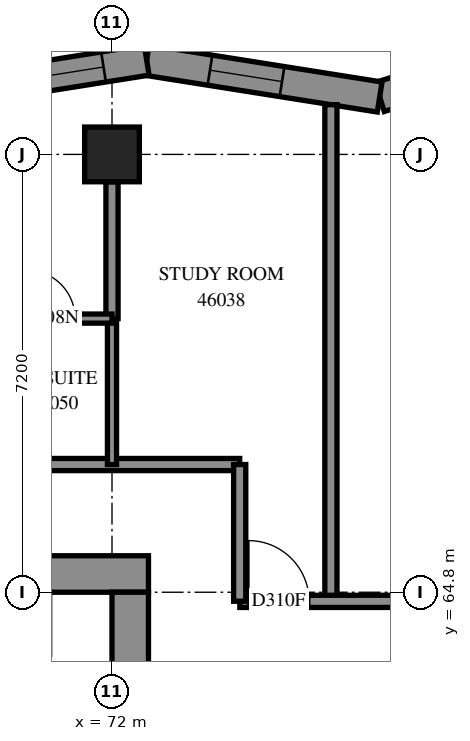
"""IFC4 building model, lengths in metres.
Left out: names, types, materials, properties, quantities, classifications, styles, units other than length and angle.
Written with IfcOpenShell. Run it as: python <this file> out.ifc"""

import sys

from ifc_helpers import new_model, si_unit, direction, frame, frame_2d, origin, origin_2d, place, context, subcontext, project, spatial, polyline, rectangle, outline, extrude, element, fill, save


model = new_model("IFC4")
c1 = context("Model", 3, precision=1e-05, world=origin(), true_north=direction((0.0, 1.0)))
c2 = subcontext(c1, "Body", "Model", "MODEL_VIEW")
j1 = project(units=[si_unit("LENGTHUNIT", "METRE"), si_unit("PLANEANGLEUNIT", "RADIAN")], contexts=[c1])
p1 = place(None, origin())
s1 = spatial("IfcSite", under=j1, at=p1, CompositionType="ELEMENT")
p2 = place(p1, origin())
s2 = spatial("IfcBuilding", under=s1, at=p2, CompositionType="ELEMENT")
p3 = place(p2, frame((0.0, 0.0, 169.4)))
s3 = spatial("IfcBuildingStorey", under=s2, at=p3, CompositionType="ELEMENT", Elevation=169.4)
p4 = place(p3, frame((72.0, 72.0, 0.0), z_axis=(0.0, 0.0, 1.0), x_axis=(1.0, 0.0, 0.0)))
e1 = element("IfcColumn", 1, at=p4, inside=s3, PredefinedType="COLUMN", context=c2, shape_type="SweptSolid", body=[
    extrude(rectangle(XDim=0.9, YDim=0.9, at=origin_2d()), origin(), (0.0, 0.0, 1.0), 3.1),
])
p5 = place(p3, frame((57.0, 65.1, -0.3), z_axis=(0.0, 0.0, 1.0), x_axis=(1.0, 0.0, 0.0)))
e2 = element("IfcWall", 2, at=p5, inside=s3, PredefinedType="SHEAR", context=c2, shape_type="SweptSolid", body=[
    extrude(rectangle(XDim=15.6, YDim=0.6, at=frame_2d((7.8, 0.0))), origin(), (0.0, 0.0, 1.0), 2.7),
])
p6 = place(p5, frame((10.6, 0.0, 0.3)))
e3 = element("IfcOpeningElement", 3, at=p6, cuts=e2, PredefinedType="OPENING", context=c2, shape_type="SweptSolid", body=[
    extrude(rectangle(XDim=0.8, YDim=2.1, at=frame_2d((0.4, 1.05))), frame((0.0, 0.31, 0.0), z_axis=(0.0, -1.0, 0.0), x_axis=(1.0, 0.0, 0.0)), (0.0, 0.0, 1.0), 0.62),
])
p7 = place(p3, frame((72.3, 50.4, -0.3), z_axis=(0.0, 0.0, 1.0), x_axis=(0.0, 1.0, 0.0)))
e4 = element("IfcWall", 4, at=p7, inside=s3, PredefinedType="SHEAR", context=c2, shape_type="SweptSolid", body=[
    extrude(rectangle(XDim=14.4, YDim=0.6, at=frame_2d((7.2, 0.0))), origin(), (0.0, 0.0, 1.0), 2.7),
])
p8 = place(p7, frame((4.55, 0.0, 0.3)))
e5 = element("IfcOpeningElement", 5, at=p8, cuts=e4, PredefinedType="OPENING", context=c2, shape_type="SweptSolid", body=[
    extrude(rectangle(XDim=1.1, YDim=2.1, at=frame_2d((0.55, 1.05))), frame((0.0, 0.31, 0.0), z_axis=(0.0, -1.0, 0.0), x_axis=(1.0, 0.0, 0.0)), (0.0, 0.0, 1.0), 0.62),
])
p9 = place(p7, frame((11.35, 0.0, 0.3)))
e6 = element("IfcOpeningElement", 6, at=p9, cuts=e4, PredefinedType="OPENING", context=c2, shape_type="SweptSolid", body=[
    extrude(rectangle(XDim=1.1, YDim=2.1, at=frame_2d((0.55, 1.05))), frame((0.0, 0.31, 0.0), z_axis=(0.0, -1.0, 0.0), x_axis=(1.0, 0.0, 0.0)), (0.0, 0.0, 1.0), 0.62),
])
p10 = place(p3, frame((80.063, 74.099, 0.0), z_axis=(0.0, 0.0, 1.0), x_axis=(-0.9536503551, -0.3009169326, 0.0)))
e7 = element("IfcWall", 7, at=p10, inside=s3, PredefinedType="SOLIDWALL", context=c2, shape_type="SweptSolid", body=[
    extrude(outline(polyline([(-0.218, -0.25), (3.78, -0.25), (3.898, 0.25), (0.218, 0.25), (-0.218, -0.25)])), origin(), (0.0, 0.0, 1.0), 3.1),
])
p11 = place(p10, frame((1.672, 0.0, 0.45)))
e8 = element("IfcOpeningElement", 8, at=p11, cuts=e7, PredefinedType="OPENING", context=c2, shape_type="SweptSolid", body=[
    extrude(rectangle(XDim=1.2, YDim=2.5, at=frame_2d((0.6, 1.25))), frame((0.0, 0.26, 0.0), z_axis=(0.0, -1.0, 0.0), x_axis=(1.0, 0.0, 0.0)), (0.0, 0.0, 1.0), 0.52),
])
p12 = place(p3, frame((76.402, 72.944, 0.0), z_axis=(0.0, 0.0, 1.0), x_axis=(-0.9877221729, 0.1562207065, 0.0)))
e9 = element("IfcWall", 9, at=p12, inside=s3, PredefinedType="SOLIDWALL", context=c2, shape_type="SweptSolid", body=[
    extrude(outline(polyline([(0.059, -0.25), (3.919, -0.25), (3.84, 0.25), (-0.059, 0.25), (0.059, -0.25)])), origin(), (0.0, 0.0, 1.0), 3.1),
])
p13 = place(p12, frame((1.626, 0.0, 0.45)))
e10 = element("IfcOpeningElement", 10, at=p13, cuts=e9, PredefinedType="OPENING", context=c2, shape_type="SweptSolid", body=[
    extrude(rectangle(XDim=1.2, YDim=2.5, at=frame_2d((0.6, 1.25))), frame((0.0, 0.26, 0.0), z_axis=(0.0, -1.0, 0.0), x_axis=(1.0, 0.0, 0.0)), (0.0, 0.0, 1.0), 0.52),
])
p14 = place(p3, frame((72.571, 73.55, 0.0), z_axis=(0.0, 0.0, 1.0), x_axis=(-0.9877213372, -0.1562259905, 0.0)))
e11 = element("IfcWall", 11, at=p14, inside=s3, PredefinedType="SOLIDWALL", context=c2, shape_type="SweptSolid", body=[
    extrude(outline(polyline([(-0.04, -0.25), (3.82, -0.25), (3.899, 0.25), (0.04, 0.25), (-0.04, -0.25)])), origin(), (0.0, 0.0, 1.0), 3.1),
])
p15 = place(p14, frame((0.719, 0.0, 0.45)))
e12 = element("IfcOpeningElement", 12, at=p15, cuts=e11, PredefinedType="OPENING", context=c2, shape_type="SweptSolid", body=[
    extrude(rectangle(XDim=2.8, YDim=2.5, at=frame_2d((1.4, 1.25))), frame((0.0, 0.26, 0.0), z_axis=(0.0, -1.0, 0.0), x_axis=(1.0, 0.0, 0.0)), (0.0, 0.0, 1.0), 0.52),
])
p16 = place(p3, frame((55.5, 66.9, 0.0), z_axis=(0.0, 0.0, 1.0), x_axis=(1.0, 0.0, 0.0)))
e13 = element("IfcWall", 13, at=p16, inside=s3, PredefinedType="PARTITIONING", context=c2, shape_type="SweptSolid", body=[
    extrude(rectangle(XDim=18.6, YDim=0.2, at=frame_2d((9.3, 0.0))), origin(), (0.0, 0.0, 1.0), 3.1),
])
p17 = place(p16, frame((4.45, 0.0, 0.0)))
e14 = element("IfcOpeningElement", 14, at=p17, cuts=e13, PredefinedType="OPENING", context=c2, shape_type="SweptSolid", body=[
    extrude(rectangle(XDim=0.9, YDim=2.1, at=frame_2d((0.45, 1.05))), frame((0.0, 0.11, 0.0), z_axis=(0.0, -1.0, 0.0), x_axis=(1.0, 0.0, 0.0)), (0.0, 0.0, 1.0), 0.22),
])
p18 = place(p16, frame((6.1, 0.0, 0.0)))
e15 = element("IfcOpeningElement", 15, at=p18, cuts=e13, PredefinedType="OPENING", context=c2, shape_type="SweptSolid", body=[
    extrude(rectangle(XDim=0.9, YDim=2.1, at=frame_2d((0.45, 1.05))), frame((0.0, 0.11, 0.0), z_axis=(0.0, -1.0, 0.0), x_axis=(1.0, 0.0, 0.0)), (0.0, 0.0, 1.0), 0.22),
])
p19 = place(p16, frame((11.65, 0.0, 0.0)))
e16 = element("IfcOpeningElement", 16, at=p19, cuts=e13, PredefinedType="OPENING", context=c2, shape_type="SweptSolid", body=[
    extrude(rectangle(XDim=0.9, YDim=2.1, at=frame_2d((0.45, 1.05))), frame((0.0, 0.11, 0.0), z_axis=(0.0, -1.0, 0.0), x_axis=(1.0, 0.0, 0.0)), (0.0, 0.0, 1.0), 0.22),
])
p20 = place(p16, frame((13.3, 0.0, 0.0)))
e17 = element("IfcOpeningElement", 17, at=p20, cuts=e13, PredefinedType="OPENING", context=c2, shape_type="SweptSolid", body=[
    extrude(rectangle(XDim=0.9, YDim=2.1, at=frame_2d((0.45, 1.05))), frame((0.0, 0.11, 0.0), z_axis=(0.0, -1.0, 0.0), x_axis=(1.0, 0.0, 0.0)), (0.0, 0.0, 1.0), 0.22),
])
p21 = place(p3, frame((75.6, 64.65, 0.0), z_axis=(0.0, 0.0, 1.0), x_axis=(0.0, 1.0, 0.0)))
e18 = element("IfcWall", 18, at=p21, inside=s3, PredefinedType="PARTITIONING", context=c2, shape_type="SweptSolid", body=[
    extrude(rectangle(XDim=8.168, YDim=0.2, at=frame_2d((4.084, 0.0))), origin(), (0.0, 0.0, 1.0), 3.1),
])
p22 = place(p3, frame((74.102, 64.65, 0.0), z_axis=(0.0, 0.0, 1.0), x_axis=(1.0, 0.0, 0.0)))
e19 = element("IfcWall", 19, at=p22, inside=s3, PredefinedType="PARTITIONING", context=c2, shape_type="SweptSolid", body=[
    extrude(rectangle(XDim=4.648, YDim=0.2, at=frame_2d((2.324, 0.0))), origin(), (0.0, 0.0, 1.0), 3.1),
])
p23 = place(p22, frame((0.14, 0.0, 0.0)))
e20 = element("IfcOpeningElement", 20, at=p23, cuts=e19, PredefinedType="OPENING", context=c2, shape_type="SweptSolid", body=[
    extrude(rectangle(XDim=1.0, YDim=2.1, at=frame_2d((0.5, 1.05))), frame((0.0, 0.11, 0.0), z_axis=(0.0, -1.0, 0.0), x_axis=(1.0, 0.0, 0.0)), (0.0, 0.0, 1.0), 0.22),
])
p24 = place(p3, frame((72.0, 66.9, 0.0), z_axis=(0.0, 0.0, 1.0), x_axis=(0.0, 1.0, 0.0)))
e21 = element("IfcWall", 21, at=p24, inside=s3, PredefinedType="PARTITIONING", context=c2, shape_type="SweptSolid", body=[
    extrude(rectangle(XDim=2.4, YDim=0.15, at=frame_2d((1.2, 0.0))), origin(), (0.0, 0.0, 1.0), 3.1),
])
p25 = place(p3, frame((72.0, 69.3, 0.0), z_axis=(0.0, 0.0, 1.0), x_axis=(0.0, 1.0, 0.0)))
e22 = element("IfcWall", 22, at=p25, inside=s3, PredefinedType="PARTITIONING", context=c2, shape_type="SweptSolid", body=[
    extrude(rectangle(XDim=2.25, YDim=0.2, at=frame_2d((1.125, 0.0))), origin(), (0.0, 0.0, 1.0), 3.1),
])
p26 = place(p3, frame((74.1, 64.652, 0.0), z_axis=(0.0, 0.0, 1.0), x_axis=(0.0, 1.0, 0.0)))
e23 = element("IfcWall", 23, at=p26, inside=s3, PredefinedType="PARTITIONING", context=c2, shape_type="SweptSolid", body=[
    extrude(rectangle(XDim=2.248, YDim=0.2, at=frame_2d((1.124, 0.0))), origin(), (0.0, 0.0, 1.0), 3.1),
])
p27 = place(p3, frame((70.1, 69.3, 0.0), z_axis=(0.0, 0.0, 1.0), x_axis=(1.0, 0.0, 0.0)))
e24 = element("IfcWall", 24, at=p27, inside=s3, PredefinedType="PARTITIONING", context=c2, shape_type="SweptSolid", body=[
    extrude(rectangle(XDim=1.9, YDim=0.15, at=frame_2d((0.95, 0.0))), origin(), (0.0, 0.0, 1.0), 3.1),
])
p28 = place(p27, frame((0.493, 0.0, 0.0)))
e25 = element("IfcOpeningElement", 25, at=p28, cuts=e24, PredefinedType="OPENING", context=c2, shape_type="SweptSolid", body=[
    extrude(rectangle(XDim=0.8, YDim=2.1, at=frame_2d((0.4, 1.05))), frame((0.0, 0.085, 0.0), z_axis=(0.0, -1.0, 0.0), x_axis=(1.0, 0.0, 0.0)), (0.0, 0.0, 1.0), 0.17),
])
p29 = place(p13, origin())
e26 = element("IfcWindow", 26, at=p29, inside=s3, PartitioningType="SINGLE_PANEL", PredefinedType="WINDOW", context=c2, shape_type="SweptSolid", body=[
    extrude(rectangle(XDim=1.2, YDim=2.5, at=frame_2d((0.6, 1.25))), frame((0.0, 0.18, 0.0), z_axis=(0.0, -1.0, 0.0), x_axis=(1.0, 0.0, 0.0)), (0.0, 0.0, 1.0), 0.06),
])
fill(e10, e26)
p30 = place(p15, origin())
e27 = element("IfcWindow", 27, at=p30, inside=s3, PartitioningType="SINGLE_PANEL", PredefinedType="WINDOW", context=c2, shape_type="SweptSolid", body=[
    extrude(rectangle(XDim=2.8, YDim=2.5, at=frame_2d((1.4, 1.25))), frame((0.0, 0.18, 0.0), z_axis=(0.0, -1.0, 0.0), x_axis=(1.0, 0.0, 0.0)), (0.0, 0.0, 1.0), 0.06),
])
fill(e12, e27)
p31 = place(p23, origin())
e28 = element("IfcDoor", 28, at=p31, inside=s3, OperationType="SINGLE_SWING_RIGHT", PredefinedType="DOOR", context=c2, shape_type="SweptSolid", body=[
    extrude(rectangle(XDim=1.0, YDim=2.1, at=frame_2d((0.5, 1.05))), frame((0.0, 0.025, 0.0), z_axis=(0.0, -1.0, 0.0), x_axis=(1.0, 0.0, 0.0)), (0.0, 0.0, 1.0), 0.05),
])
fill(e20, e28)
p32 = place(p28, origin())
e29 = element("IfcDoor", 29, at=p32, inside=s3, OperationType="SINGLE_SWING_RIGHT", PredefinedType="DOOR", context=c2, shape_type="SweptSolid", body=[
    extrude(rectangle(XDim=0.8, YDim=2.1, at=frame_2d((0.4, 1.05))), frame((0.0, 0.025, 0.0), z_axis=(0.0, -1.0, 0.0), x_axis=(1.0, 0.0, 0.0)), (0.0, 0.0, 1.0), 0.05),
])
fill(e25, e29)
save(model, sys.argv[1])
